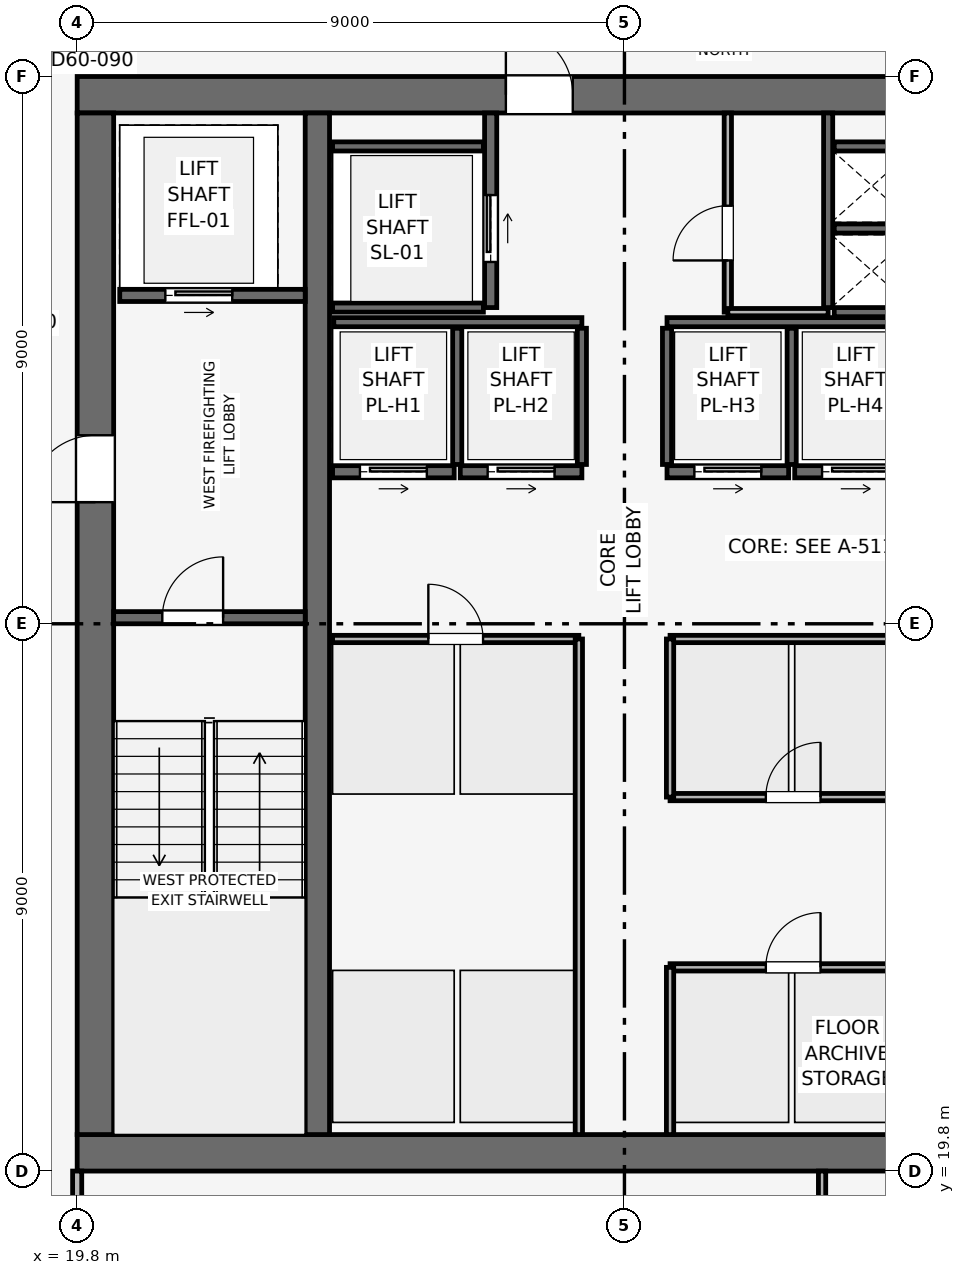
"""IFC4 building model, lengths in metres.
Left out: names, types, materials, properties, quantities, classifications, styles, units other than length and angle.
Written with IfcOpenShell. Run it as: python <this file> out.ifc"""

import sys

from ifc_helpers import new_model, si_unit, direction, frame, frame_2d, origin, place, context, subcontext, project, spatial, rectangle, extrude, element, fill, save


model = new_model("IFC4")
c1 = context("Model", 3, precision=1e-05, world=origin(), true_north=direction((0.0, 1.0)))
c2 = subcontext(c1, "Body", "Model", "MODEL_VIEW")
j1 = project(units=[si_unit("LENGTHUNIT", "METRE"), si_unit("PLANEANGLEUNIT", "RADIAN")], contexts=[c1])
p1 = place(None, origin())
s1 = spatial("IfcSite", under=j1, at=p1, CompositionType="ELEMENT")
p2 = place(p1, origin())
s2 = spatial("IfcBuilding", under=s1, at=p2, CompositionType="ELEMENT")
p3 = place(p2, frame((0.0, 0.0, 348.0)))
s3 = spatial("IfcBuildingStorey", under=s2, at=p3, CompositionType="ELEMENT", Elevation=348.0)
p4 = place(p3, frame((19.8, 20.1, 0.0), z_axis=(0.0, 0.0, 1.0), x_axis=(1.0, 0.0, 0.0)))
e1 = element("IfcWall", 1, at=p4, inside=s3, PredefinedType="SHEAR", context=c2, shape_type="SweptSolid", body=[
    extrude(rectangle(XDim=18.0, YDim=0.6, at=frame_2d((9.0, 0.0))), origin(), (0.0, 0.0, 1.0), 3.75),
])
p5 = place(p3, frame((19.8, 37.5, 0.0), z_axis=(0.0, 0.0, 1.0), x_axis=(1.0, 0.0, 0.0)))
e2 = element("IfcWall", 2, at=p5, inside=s3, PredefinedType="SHEAR", context=c2, shape_type="SweptSolid", body=[
    extrude(rectangle(XDim=18.0, YDim=0.6, at=frame_2d((9.0, 0.0))), origin(), (0.0, 0.0, 1.0), 3.75),
])
p6 = place(p5, frame((7.05, 0.0, 0.0)))
e3 = element("IfcOpeningElement", 3, at=p6, cuts=e2, PredefinedType="OPENING", context=c2, shape_type="SweptSolid", body=[
    extrude(rectangle(XDim=1.1, YDim=2.15, at=frame_2d((0.55, 1.075))), frame((0.0, 0.31, 0.0), z_axis=(0.0, -1.0, 0.0), x_axis=(1.0, 0.0, 0.0)), (0.0, 0.0, 1.0), 0.62),
])
p7 = place(p3, frame((20.1, 20.4, 0.0), z_axis=(0.0, 0.0, 1.0), x_axis=(0.0, 1.0, 0.0)))
e4 = element("IfcWall", 4, at=p7, inside=s3, PredefinedType="SHEAR", context=c2, shape_type="SweptSolid", body=[
    extrude(rectangle(XDim=16.8, YDim=0.6, at=frame_2d((8.4, 0.0))), origin(), (0.0, 0.0, 1.0), 3.75),
])
p8 = place(p7, frame((10.4, 0.0, 0.0)))
e5 = element("IfcOpeningElement", 5, at=p8, cuts=e4, PredefinedType="OPENING", context=c2, shape_type="SweptSolid", body=[
    extrude(rectangle(XDim=1.1, YDim=2.15, at=frame_2d((0.55, 1.075))), frame((0.0, 0.31, 0.0), z_axis=(0.0, -1.0, 0.0), x_axis=(1.0, 0.0, 0.0)), (0.0, 0.0, 1.0), 0.62),
])
p9 = place(p3, frame((23.75, 20.4, 0.0), z_axis=(0.0, 0.0, 1.0), x_axis=(0.0, 1.0, 0.0)))
e6 = element("IfcWall", 6, at=p9, inside=s3, PredefinedType="SHEAR", context=c2, shape_type="SweptSolid", body=[
    extrude(rectangle(XDim=16.8, YDim=0.4, at=frame_2d((8.4, 0.0))), origin(), (0.0, 0.0, 1.0), 3.75),
])
p10 = place(p3, frame((20.4, 28.9, 0.0), z_axis=(0.0, 0.0, 1.0), x_axis=(1.0, 0.0, 0.0)))
e7 = element("IfcWall", 7, at=p10, inside=s3, PredefinedType="SHEAR", context=c2, shape_type="SweptSolid", body=[
    extrude(rectangle(XDim=3.15, YDim=0.2, at=frame_2d((1.575, 0.0))), origin(), (0.0, 0.0, 1.0), 3.51),
])
p11 = place(p10, frame((0.8, 0.0, 0.0)))
e8 = element("IfcOpeningElement", 8, at=p11, cuts=e7, PredefinedType="OPENING", context=c2, shape_type="SweptSolid", body=[
    extrude(rectangle(XDim=1.0, YDim=2.1, at=frame_2d((0.5, 1.05))), frame((0.0, 0.11, 0.0), z_axis=(0.0, -1.0, 0.0), x_axis=(1.0, 0.0, 0.0)), (0.0, 0.0, 1.0), 0.22),
])
p12 = place(p3, frame((32.15, 34.0, 0.0), z_axis=(0.0, 0.0, 1.0), x_axis=(0.0, 1.0, 0.0)))
e9 = element("IfcWall", 9, at=p12, inside=s3, PredefinedType="SHEAR", context=c2, shape_type="SweptSolid", body=[
    extrude(rectangle(XDim=3.2, YDim=0.15, at=frame_2d((1.6, 0.0))), origin(), (0.0, 0.0, 1.0), 3.51),
])
for number, where, z_axis, x_axis in (
    (10, (32.25, 33.925, 0.0), (0.0, 0.0, 1.0), (1.0, 0.0, 0.0)),
    (11, (32.25, 35.3, 0.0), (0.0, 0.0, 1.0), (1.0, 0.0, 0.0)),
):
    element("IfcWall", number, at=place(p3, frame(where, z_axis=z_axis, x_axis=x_axis)), inside=s3, PredefinedType="SHEAR", context=c2, shape_type="SweptSolid", body=[
        extrude(rectangle(XDim=1.33, YDim=0.15, at=frame_2d((0.665, 0.0))), origin(), (0.0, 0.0, 1.0), 3.51),
    ])
p13 = place(p3, frame((20.5, 34.2, 0.0), z_axis=(0.0, 0.0, 1.0), x_axis=(1.0, 0.0, 0.0)))
e12 = element("IfcWall", 12, at=p13, inside=s3, PredefinedType="SHEAR", context=c2, shape_type="SweptSolid", body=[
    extrude(rectangle(XDim=3.05, YDim=0.2, at=frame_2d((1.525, 0.0))), origin(), (0.0, 0.0, 1.0), 3.51),
])
p14 = place(p13, frame((0.75, 0.0, 0.0)))
e13 = element("IfcOpeningElement", 13, at=p14, cuts=e12, PredefinedType="OPENING", context=c2, shape_type="SweptSolid", body=[
    extrude(rectangle(XDim=1.1, YDim=2.15, at=frame_2d((0.55, 1.075))), frame((0.0, 0.11, 0.0), z_axis=(0.0, -1.0, 0.0), x_axis=(1.0, 0.0, 0.0)), (0.0, 0.0, 1.0), 0.22),
])
p15 = place(p3, frame((26.6, 34.0, 0.0), z_axis=(0.0, 0.0, 1.0), x_axis=(0.0, 1.0, 0.0)))
e14 = element("IfcWall", 14, at=p15, inside=s3, PredefinedType="SHEAR", context=c2, shape_type="SweptSolid", body=[
    extrude(rectangle(XDim=3.2, YDim=0.2, at=frame_2d((1.6, 0.0))), origin(), (0.0, 0.0, 1.0), 3.51),
])
p16 = place(p15, frame((0.75, 0.0, 0.0)))
e15 = element("IfcOpeningElement", 15, at=p16, cuts=e14, PredefinedType="OPENING", context=c2, shape_type="SweptSolid", body=[
    extrude(rectangle(XDim=1.1, YDim=2.15, at=frame_2d((0.55, 1.075))), frame((0.0, 0.11, 0.0), z_axis=(0.0, -1.0, 0.0), x_axis=(1.0, 0.0, 0.0)), (0.0, 0.0, 1.0), 0.22),
])
for number, where, z_axis, x_axis in (
    (16, (24.0, 34.0, 0.0), (0.0, 0.0, 1.0), (1.0, 0.0, 0.0)),
    (17, (24.0, 36.65, 0.0), (0.0, 0.0, 1.0), (1.0, 0.0, 0.0)),
):
    element("IfcWall", number, at=place(p3, frame(where, z_axis=z_axis, x_axis=x_axis)), inside=s3, PredefinedType="SHEAR", context=c2, shape_type="SweptSolid", body=[
        extrude(rectangle(XDim=2.48, YDim=0.15, at=frame_2d((1.24, 0.0))), origin(), (0.0, 0.0, 1.0), 3.51),
    ])
p17 = place(p3, frame((24.0, 31.3, 0.0), z_axis=(0.0, 0.0, 1.0), x_axis=(1.0, 0.0, 0.0)))
e18 = element("IfcWall", 18, at=p17, inside=s3, PredefinedType="SHEAR", context=c2, shape_type="SweptSolid", body=[
    extrude(rectangle(XDim=2.0, YDim=0.2, at=frame_2d((1.0, 0.0))), origin(), (0.0, 0.0, 1.0), 3.51),
])
p18 = place(p17, frame((0.45, 0.0, 0.0)))
e19 = element("IfcOpeningElement", 19, at=p18, cuts=e18, PredefinedType="OPENING", context=c2, shape_type="SweptSolid", body=[
    extrude(rectangle(XDim=1.1, YDim=2.15, at=frame_2d((0.55, 1.075))), frame((0.0, 0.11, 0.0), z_axis=(0.0, -1.0, 0.0), x_axis=(1.0, 0.0, 0.0)), (0.0, 0.0, 1.0), 0.22),
])
p19 = place(p3, frame((26.1, 31.3, 0.0), z_axis=(0.0, 0.0, 1.0), x_axis=(1.0, 0.0, 0.0)))
e20 = element("IfcWall", 20, at=p19, inside=s3, PredefinedType="SHEAR", context=c2, shape_type="SweptSolid", body=[
    extrude(rectangle(XDim=2.0, YDim=0.2, at=frame_2d((1.0, 0.0))), origin(), (0.0, 0.0, 1.0), 3.51),
])
p20 = place(p19, frame((0.45, 0.0, 0.0)))
e21 = element("IfcOpeningElement", 21, at=p20, cuts=e20, PredefinedType="OPENING", context=c2, shape_type="SweptSolid", body=[
    extrude(rectangle(XDim=1.1, YDim=2.15, at=frame_2d((0.55, 1.075))), frame((0.0, 0.11, 0.0), z_axis=(0.0, -1.0, 0.0), x_axis=(1.0, 0.0, 0.0)), (0.0, 0.0, 1.0), 0.22),
])
p21 = place(p3, frame((29.5, 31.3, 0.0), z_axis=(0.0, 0.0, 1.0), x_axis=(1.0, 0.0, 0.0)))
e22 = element("IfcWall", 22, at=p21, inside=s3, PredefinedType="SHEAR", context=c2, shape_type="SweptSolid", body=[
    extrude(rectangle(XDim=2.0, YDim=0.2, at=frame_2d((1.0, 0.0))), origin(), (0.0, 0.0, 1.0), 3.51),
])
p22 = place(p21, frame((0.45, 0.0, 0.0)))
e23 = element("IfcOpeningElement", 23, at=p22, cuts=e22, PredefinedType="OPENING", context=c2, shape_type="SweptSolid", body=[
    extrude(rectangle(XDim=1.1, YDim=2.15, at=frame_2d((0.55, 1.075))), frame((0.0, 0.11, 0.0), z_axis=(0.0, -1.0, 0.0), x_axis=(1.0, 0.0, 0.0)), (0.0, 0.0, 1.0), 0.22),
])
p23 = place(p3, frame((31.6, 31.3, 0.0), z_axis=(0.0, 0.0, 1.0), x_axis=(1.0, 0.0, 0.0)))
e24 = element("IfcWall", 24, at=p23, inside=s3, PredefinedType="SHEAR", context=c2, shape_type="SweptSolid", body=[
    extrude(rectangle(XDim=2.0, YDim=0.2, at=frame_2d((1.0, 0.0))), origin(), (0.0, 0.0, 1.0), 3.51),
])
p24 = place(p23, frame((0.45, 0.0, 0.0)))
e25 = element("IfcOpeningElement", 25, at=p24, cuts=e24, PredefinedType="OPENING", context=c2, shape_type="SweptSolid", body=[
    extrude(rectangle(XDim=1.1, YDim=2.15, at=frame_2d((0.55, 1.075))), frame((0.0, 0.11, 0.0), z_axis=(0.0, -1.0, 0.0), x_axis=(1.0, 0.0, 0.0)), (0.0, 0.0, 1.0), 0.22),
])
p25 = place(p3, frame((32.25, 36.65, 0.0), z_axis=(0.0, 0.0, 1.0), x_axis=(1.0, 0.0, 0.0)))
e26 = element("IfcWall", 26, at=p25, inside=s3, PredefinedType="SHEAR", context=c2, shape_type="SweptSolid", body=[
    extrude(rectangle(XDim=1.33, YDim=0.15, at=frame_2d((0.665, 0.0))), origin(), (0.0, 0.0, 1.0), 3.51),
])
for number, where, z_axis, x_axis in (
    (27, (24.02, 33.76, 0.0), (0.0, 0.0, 1.0), (1.0, 0.0, 0.0)),
    (28, (29.5, 33.76, 0.0), (0.0, 0.0, 1.0), (1.0, 0.0, 0.0)),
):
    element("IfcWall", number, at=place(p3, frame(where, z_axis=z_axis, x_axis=x_axis)), inside=s3, PredefinedType="SHEAR", context=c2, shape_type="SweptSolid", body=[
        extrude(rectangle(XDim=4.08, YDim=0.15, at=frame_2d((2.04, 0.0))), origin(), (0.0, 0.0, 1.0), 3.51),
    ])
for number, where, z_axis, x_axis in (
    (29, (26.05, 31.42, 0.0), (0.0, 0.0, 1.0), (0.0, 1.0, 0.0)),
    (30, (28.1, 31.42, 0.0), (0.0, 0.0, 1.0), (0.0, 1.0, 0.0)),
    (31, (29.5, 31.42, 0.0), (0.0, 0.0, 1.0), (0.0, 1.0, 0.0)),
    (32, (31.55, 31.42, 0.0), (0.0, 0.0, 1.0), (0.0, 1.0, 0.0)),
):
    element("IfcWall", number, at=place(p3, frame(where, z_axis=z_axis, x_axis=x_axis)), inside=s3, PredefinedType="SHEAR", context=c2, shape_type="SweptSolid", body=[
        extrude(rectangle(XDim=2.24, YDim=0.15, at=frame_2d((1.12, 0.0))), origin(), (0.0, 0.0, 1.0), 3.51),
    ])
p26 = place(p3, frame((30.5, 33.925, 0.0), z_axis=(0.0, 0.0, 1.0), x_axis=(0.0, 1.0, 0.0)))
e33 = element("IfcWall", 33, at=p26, inside=s3, PredefinedType="PARTITIONING", context=c2, shape_type="SweptSolid", body=[
    extrude(rectangle(XDim=3.275, YDim=0.12, at=frame_2d((1.637, 0.0))), origin(), (0.0, 0.0, 1.0), 3.51),
])
p27 = place(p26, frame((0.85, 0.0, 0.0)))
e34 = element("IfcOpeningElement", 34, at=p27, cuts=e33, PredefinedType="OPENING", context=c2, shape_type="SweptSolid", body=[
    extrude(rectangle(XDim=0.9, YDim=2.1, at=frame_2d((0.45, 1.05))), frame((0.0, 0.07, 0.0), z_axis=(0.0, -1.0, 0.0), x_axis=(1.0, 0.0, 0.0)), (0.0, 0.0, 1.0), 0.14),
])
p28 = place(p3, frame((30.5, 33.925, 0.0), z_axis=(0.0, 0.0, 1.0), x_axis=(1.0, 0.0, 0.0)))
e35 = element("IfcWall", 35, at=p28, inside=s3, PredefinedType="PARTITIONING", context=c2, shape_type="SweptSolid", body=[
    extrude(rectangle(XDim=1.65, YDim=0.12, at=frame_2d((0.825, 0.0))), origin(), (0.0, 0.0, 1.0), 3.51),
])
p29 = place(p3, frame((24.0, 28.55, 0.0), z_axis=(0.0, 0.0, 1.0), x_axis=(1.0, 0.0, 0.0)))
e36 = element("IfcWall", 36, at=p29, inside=s3, PredefinedType="PARTITIONING", context=c2, shape_type="SweptSolid", body=[
    extrude(rectangle(XDim=4.05, YDim=0.12, at=frame_2d((2.025, 0.0))), origin(), (0.0, 0.0, 1.0), 3.51),
])
p30 = place(p29, frame((1.575, 0.0, 0.0)))
e37 = element("IfcOpeningElement", 37, at=p30, cuts=e36, PredefinedType="OPENING", context=c2, shape_type="SweptSolid", body=[
    extrude(rectangle(XDim=0.9, YDim=2.1, at=frame_2d((0.45, 1.05))), frame((0.0, 0.07, 0.0), z_axis=(0.0, -1.0, 0.0), x_axis=(1.0, 0.0, 0.0)), (0.0, 0.0, 1.0), 0.14),
])
p31 = place(p3, frame((28.05, 20.4, 0.0), z_axis=(0.0, 0.0, 1.0), x_axis=(0.0, 1.0, 0.0)))
e38 = element("IfcWall", 38, at=p31, inside=s3, PredefinedType="PARTITIONING", context=c2, shape_type="SweptSolid", body=[
    extrude(rectangle(XDim=8.15, YDim=0.12, at=frame_2d((4.075, 0.0))), origin(), (0.0, 0.0, 1.0), 3.51),
])
p32 = place(p3, frame((29.55, 23.15, 0.0), z_axis=(0.0, 0.0, 1.0), x_axis=(1.0, 0.0, 0.0)))
e39 = element("IfcWall", 39, at=p32, inside=s3, PredefinedType="PARTITIONING", context=c2, shape_type="SweptSolid", body=[
    extrude(rectangle(XDim=4.05, YDim=0.12, at=frame_2d((2.025, 0.0))), origin(), (0.0, 0.0, 1.0), 3.51),
])
p33 = place(p32, frame((1.575, 0.0, 0.0)))
e40 = element("IfcOpeningElement", 40, at=p33, cuts=e39, PredefinedType="OPENING", context=c2, shape_type="SweptSolid", body=[
    extrude(rectangle(XDim=0.9, YDim=2.1, at=frame_2d((0.45, 1.05))), frame((0.0, 0.07, 0.0), z_axis=(0.0, -1.0, 0.0), x_axis=(1.0, 0.0, 0.0)), (0.0, 0.0, 1.0), 0.14),
])
p34 = place(p3, frame((29.55, 20.4, 0.0), z_axis=(0.0, 0.0, 1.0), x_axis=(0.0, 1.0, 0.0)))
e41 = element("IfcWall", 41, at=p34, inside=s3, PredefinedType="PARTITIONING", context=c2, shape_type="SweptSolid", body=[
    extrude(rectangle(XDim=2.75, YDim=0.12, at=frame_2d((1.375, 0.0))), origin(), (0.0, 0.0, 1.0), 3.51),
])
p35 = place(p3, frame((29.55, 25.95, 0.0), z_axis=(0.0, 0.0, 1.0), x_axis=(1.0, 0.0, 0.0)))
e42 = element("IfcWall", 42, at=p35, inside=s3, PredefinedType="PARTITIONING", context=c2, shape_type="SweptSolid", body=[
    extrude(rectangle(XDim=4.05, YDim=0.12, at=frame_2d((2.025, 0.0))), origin(), (0.0, 0.0, 1.0), 3.51),
])
p36 = place(p35, frame((1.575, 0.0, 0.0)))
e43 = element("IfcOpeningElement", 43, at=p36, cuts=e42, PredefinedType="OPENING", context=c2, shape_type="SweptSolid", body=[
    extrude(rectangle(XDim=0.9, YDim=2.1, at=frame_2d((0.45, 1.05))), frame((0.0, 0.07, 0.0), z_axis=(0.0, -1.0, 0.0), x_axis=(1.0, 0.0, 0.0)), (0.0, 0.0, 1.0), 0.14),
])
p37 = place(p3, frame((29.55, 28.55, 0.0), z_axis=(0.0, 0.0, 1.0), x_axis=(1.0, 0.0, 0.0)))
e44 = element("IfcWall", 44, at=p37, inside=s3, PredefinedType="PARTITIONING", context=c2, shape_type="SweptSolid", body=[
    extrude(rectangle(XDim=4.05, YDim=0.12, at=frame_2d((2.025, 0.0))), origin(), (0.0, 0.0, 1.0), 3.51),
])
p38 = place(p3, frame((29.55, 25.95, 0.0), z_axis=(0.0, 0.0, 1.0), x_axis=(0.0, 1.0, 0.0)))
e45 = element("IfcWall", 45, at=p38, inside=s3, PredefinedType="PARTITIONING", context=c2, shape_type="SweptSolid", body=[
    extrude(rectangle(XDim=2.6, YDim=0.12, at=frame_2d((1.3, 0.0))), origin(), (0.0, 0.0, 1.0), 3.51),
])
p39 = place(p3, frame((19.8, 7.63, 0.0), z_axis=(0.0, 0.0, 1.0), x_axis=(0.0, 1.0, 0.0)))
e46 = element("IfcWall", 46, at=p39, inside=s3, PredefinedType="PARTITIONING", context=c2, shape_type="SweptSolid", body=[
    extrude(rectangle(XDim=12.17, YDim=0.15, at=frame_2d((6.085, 0.0))), origin(), (0.0, 0.0, 1.0), 3.095),
])
p40 = place(p39, frame((8.47, 0.0, 0.0)))
e47 = element("IfcOpeningElement", 47, at=p40, cuts=e46, PredefinedType="OPENING", context=c2, shape_type="SweptSolid", body=[
    extrude(rectangle(XDim=0.9, YDim=2.1, at=frame_2d((0.45, 1.05))), frame((0.0, 0.085, 0.0), z_axis=(0.0, -1.0, 0.0), x_axis=(1.0, 0.0, 0.0)), (0.0, 0.0, 1.0), 0.17),
])
p41 = place(p3, frame((32.05, 7.63, 0.0), z_axis=(0.0, 0.0, 1.0), x_axis=(0.0, 1.0, 0.0)))
e48 = element("IfcWall", 48, at=p41, inside=s3, PredefinedType="PARTITIONING", context=c2, shape_type="SweptSolid", body=[
    extrude(rectangle(XDim=12.17, YDim=0.12, at=frame_2d((6.085, 0.0))), origin(), (0.0, 0.0, 1.0), 3.135),
])
p42 = place(p41, frame((9.77, 0.0, 0.0)))
e49 = element("IfcOpeningElement", 49, at=p42, cuts=e48, PredefinedType="OPENING", context=c2, shape_type="SweptSolid", body=[
    extrude(rectangle(XDim=0.9, YDim=2.1, at=frame_2d((0.45, 1.05))), frame((0.0, 0.07, 0.0), z_axis=(0.0, -1.0, 0.0), x_axis=(1.0, 0.0, 0.0)), (0.0, 0.0, 1.0), 0.14),
])
p43 = place(p11, origin())
e50 = element("IfcDoor", 50, at=p43, inside=s3, OperationType="SINGLE_SWING_RIGHT", PredefinedType="DOOR", context=c2, shape_type="SweptSolid", body=[
    extrude(rectangle(XDim=1.0, YDim=2.1, at=frame_2d((0.5, 1.05))), frame((0.0, 0.025, 0.0), z_axis=(0.0, -1.0, 0.0), x_axis=(1.0, 0.0, 0.0)), (0.0, 0.0, 1.0), 0.05),
])
fill(e8, e50)
p44 = place(p14, origin())
e51 = element("IfcDoor", 51, at=p44, inside=s3, OperationType="SLIDING_TO_RIGHT", PredefinedType="DOOR", context=c2, shape_type="SweptSolid", body=[
    extrude(rectangle(XDim=1.1, YDim=2.15, at=frame_2d((0.55, 1.075))), frame((0.0, 0.025, 0.0), z_axis=(0.0, -1.0, 0.0), x_axis=(1.0, 0.0, 0.0)), (0.0, 0.0, 1.0), 0.05),
])
fill(e13, e51)
p45 = place(p16, origin())
e52 = element("IfcDoor", 52, at=p45, inside=s3, OperationType="SLIDING_TO_RIGHT", PredefinedType="DOOR", context=c2, shape_type="SweptSolid", body=[
    extrude(rectangle(XDim=1.1, YDim=2.15, at=frame_2d((0.55, 1.075))), frame((0.0, 0.025, 0.0), z_axis=(0.0, -1.0, 0.0), x_axis=(1.0, 0.0, 0.0)), (0.0, 0.0, 1.0), 0.05),
])
fill(e15, e52)
p46 = place(p18, origin())
e53 = element("IfcDoor", 53, at=p46, inside=s3, OperationType="SLIDING_TO_RIGHT", PredefinedType="DOOR", context=c2, shape_type="SweptSolid", body=[
    extrude(rectangle(XDim=1.1, YDim=2.15, at=frame_2d((0.55, 1.075))), frame((0.0, 0.025, 0.0), z_axis=(0.0, -1.0, 0.0), x_axis=(1.0, 0.0, 0.0)), (0.0, 0.0, 1.0), 0.05),
])
fill(e19, e53)
p47 = place(p20, origin())
e54 = element("IfcDoor", 54, at=p47, inside=s3, OperationType="SLIDING_TO_RIGHT", PredefinedType="DOOR", context=c2, shape_type="SweptSolid", body=[
    extrude(rectangle(XDim=1.1, YDim=2.15, at=frame_2d((0.55, 1.075))), frame((0.0, 0.025, 0.0), z_axis=(0.0, -1.0, 0.0), x_axis=(1.0, 0.0, 0.0)), (0.0, 0.0, 1.0), 0.05),
])
fill(e21, e54)
p48 = place(p22, origin())
e55 = element("IfcDoor", 55, at=p48, inside=s3, OperationType="SLIDING_TO_RIGHT", PredefinedType="DOOR", context=c2, shape_type="SweptSolid", body=[
    extrude(rectangle(XDim=1.1, YDim=2.15, at=frame_2d((0.55, 1.075))), frame((0.0, 0.025, 0.0), z_axis=(0.0, -1.0, 0.0), x_axis=(1.0, 0.0, 0.0)), (0.0, 0.0, 1.0), 0.05),
])
fill(e23, e55)
p49 = place(p24, origin())
e56 = element("IfcDoor", 56, at=p49, inside=s3, OperationType="SLIDING_TO_RIGHT", PredefinedType="DOOR", context=c2, shape_type="SweptSolid", body=[
    extrude(rectangle(XDim=1.1, YDim=2.15, at=frame_2d((0.55, 1.075))), frame((0.0, 0.025, 0.0), z_axis=(0.0, -1.0, 0.0), x_axis=(1.0, 0.0, 0.0)), (0.0, 0.0, 1.0), 0.05),
])
fill(e25, e56)
p50 = place(p27, origin())
e57 = element("IfcDoor", 57, at=p50, inside=s3, OperationType="SINGLE_SWING_LEFT", PredefinedType="DOOR", context=c2, shape_type="SweptSolid", body=[
    extrude(rectangle(XDim=0.9, YDim=2.1, at=frame_2d((0.45, 1.05))), frame((0.0, 0.025, 0.0), z_axis=(0.0, -1.0, 0.0), x_axis=(1.0, 0.0, 0.0)), (0.0, 0.0, 1.0), 0.05),
])
fill(e34, e57)
p51 = place(p30, origin())
e58 = element("IfcDoor", 58, at=p51, inside=s3, OperationType="SINGLE_SWING_LEFT", PredefinedType="DOOR", context=c2, shape_type="SweptSolid", body=[
    extrude(rectangle(XDim=0.9, YDim=2.1, at=frame_2d((0.45, 1.05))), frame((0.0, 0.025, 0.0), z_axis=(0.0, -1.0, 0.0), x_axis=(1.0, 0.0, 0.0)), (0.0, 0.0, 1.0), 0.05),
])
fill(e37, e58)
p52 = place(p33, origin())
e59 = element("IfcDoor", 59, at=p52, inside=s3, OperationType="SINGLE_SWING_RIGHT", PredefinedType="DOOR", context=c2, shape_type="SweptSolid", body=[
    extrude(rectangle(XDim=0.9, YDim=2.1, at=frame_2d((0.45, 1.05))), frame((0.0, 0.025, 0.0), z_axis=(0.0, -1.0, 0.0), x_axis=(1.0, 0.0, 0.0)), (0.0, 0.0, 1.0), 0.05),
])
fill(e40, e59)
p53 = place(p36, origin())
e60 = element("IfcDoor", 60, at=p53, inside=s3, OperationType="SINGLE_SWING_RIGHT", PredefinedType="DOOR", context=c2, shape_type="SweptSolid", body=[
    extrude(rectangle(XDim=0.9, YDim=2.1, at=frame_2d((0.45, 1.05))), frame((0.0, 0.025, 0.0), z_axis=(0.0, -1.0, 0.0), x_axis=(1.0, 0.0, 0.0)), (0.0, 0.0, 1.0), 0.05),
])
fill(e43, e60)
p54 = place(p8, origin())
e61 = element("IfcDoor", 61, at=p54, inside=s3, OperationType="SINGLE_SWING_LEFT", PredefinedType="DOOR", context=c2, shape_type="SweptSolid", body=[
    extrude(rectangle(XDim=1.1, YDim=2.15, at=frame_2d((0.55, 1.075))), frame((0.0, 0.025, 0.0), z_axis=(0.0, -1.0, 0.0), x_axis=(1.0, 0.0, 0.0)), (0.0, 0.0, 1.0), 0.05),
])
fill(e5, e61)
p55 = place(p6, origin())
e62 = element("IfcDoor", 62, at=p55, inside=s3, OperationType="SINGLE_SWING_LEFT", PredefinedType="DOOR", context=c2, shape_type="SweptSolid", body=[
    extrude(rectangle(XDim=1.1, YDim=2.15, at=frame_2d((0.55, 1.075))), frame((0.0, 0.025, 0.0), z_axis=(0.0, -1.0, 0.0), x_axis=(1.0, 0.0, 0.0)), (0.0, 0.0, 1.0), 0.05),
])
fill(e3, e62)
save(model, sys.argv[1])
